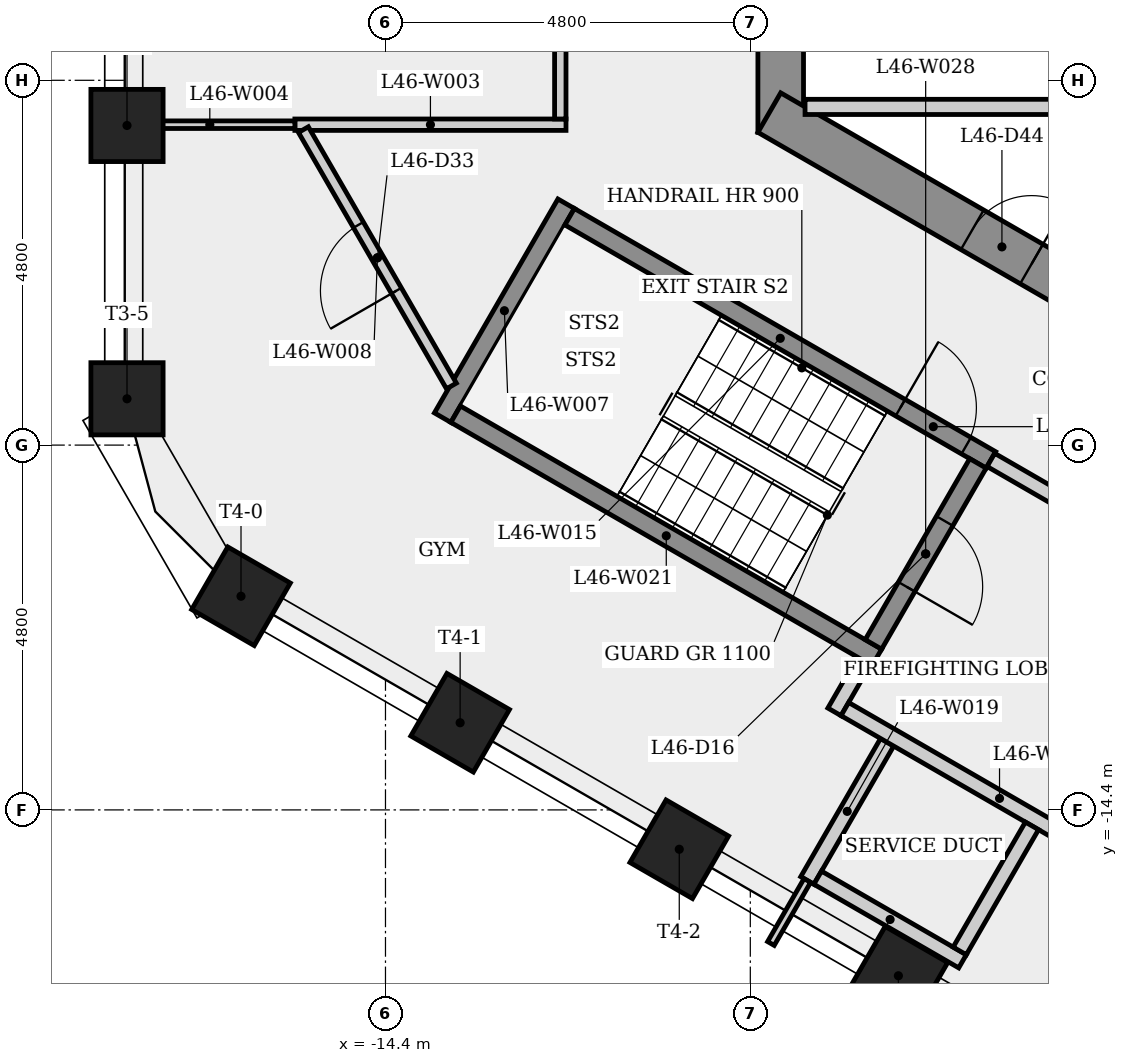
"""IFC4 building model, lengths in metres.
Left out: names, types, materials, properties, quantities, classifications, styles, units other than length and angle.
Written with IfcOpenShell. Run it as: python <this file> out.ifc"""

import sys

from ifc_helpers import new_model, si_unit, direction, frame, frame_2d, origin, origin_2d, place, context, subcontext, project, spatial, rectangle, extrude, element, fill, save


model = new_model("IFC4")
c1 = context("Model", 3, precision=1e-05, world=origin(), true_north=direction((0.0, 1.0)))
c2 = subcontext(c1, "Body", "Model", "MODEL_VIEW")
j1 = project(units=[si_unit("LENGTHUNIT", "METRE"), si_unit("PLANEANGLEUNIT", "RADIAN")], contexts=[c1])
p1 = place(None, origin())
s1 = spatial("IfcSite", under=j1, at=p1, CompositionType="ELEMENT")
p2 = place(p1, origin())
s2 = spatial("IfcBuilding", under=s1, at=p2, CompositionType="ELEMENT")
p3 = place(p2, frame((0.0, 0.0, 173.1)))
s3 = spatial("IfcBuildingStorey", under=s2, at=p3, CompositionType="ELEMENT", Elevation=173.1)
p4 = place(p3, frame((-9.2, 5.485, 0.0), z_axis=(0.0, 0.0, 1.0), x_axis=(0.0, -1.0, 0.0)))
e1 = element("IfcWall", 1, at=p4, inside=s3, PredefinedType="SHEAR", context=c2, shape_type="SweptSolid", body=[
    extrude(rectangle(XDim=10.97, YDim=0.6, at=frame_2d((5.485, 0.0))), origin(), (0.0, 0.0, 1.0), 3.4),
])
p5 = place(p4, frame((8.516, 0.0, 0.0)))
e2 = element("IfcOpeningElement", 2, at=p5, cuts=e1, PredefinedType="OPENING", context=c2, shape_type="SweptSolid", body=[
    extrude(rectangle(XDim=0.9, YDim=2.1, at=frame_2d((0.45, 1.05))), frame((0.0, 0.31, 0.0), z_axis=(0.0, -1.0, 0.0), x_axis=(1.0, 0.0, 0.0)), (0.0, 0.0, 1.0), 0.62),
])
p6 = place(p4, frame((4.685, 0.0, 0.0)))
e3 = element("IfcOpeningElement", 3, at=p6, cuts=e1, PredefinedType="OPENING", context=c2, shape_type="SweptSolid", body=[
    extrude(rectangle(XDim=1.6, YDim=2.1, at=frame_2d((0.8, 1.05))), frame((0.0, 0.31, 0.0), z_axis=(0.0, -1.0, 0.0), x_axis=(1.0, 0.0, 0.0)), (0.0, 0.0, 1.0), 0.62),
])
p7 = place(p3, frame((-9.35, -5.225, 0.0), z_axis=(0.0, 0.0, 1.0), x_axis=(0.866023993627, -0.500002442456, 0.0)))
e4 = element("IfcWall", 4, at=p7, inside=s3, PredefinedType="SHEAR", context=c2, shape_type="SweptSolid", body=[
    extrude(rectangle(XDim=10.97, YDim=0.6, at=frame_2d((5.485, 0.0))), origin(), (0.0, 0.0, 1.0), 3.4),
])
p8 = place(p7, frame((3.084, 0.0, 0.0)))
e5 = element("IfcOpeningElement", 5, at=p8, cuts=e4, PredefinedType="OPENING", context=c2, shape_type="SweptSolid", body=[
    extrude(rectangle(XDim=0.9, YDim=2.1, at=frame_2d((0.45, 1.05))), frame((0.0, 0.31, 0.0), z_axis=(0.0, -1.0, 0.0), x_axis=(1.0, 0.0, 0.0)), (0.0, 0.0, 1.0), 0.62),
])
p9 = place(p7, frame((8.21, 0.0, 0.0)))
e6 = element("IfcOpeningElement", 6, at=p9, cuts=e4, PredefinedType="OPENING", context=c2, shape_type="SweptSolid", body=[
    extrude(rectangle(XDim=0.9, YDim=2.1, at=frame_2d((0.45, 1.05))), frame((0.0, 0.31, 0.0), z_axis=(0.0, -1.0, 0.0), x_axis=(1.0, 0.0, 0.0)), (0.0, 0.0, 1.0), 0.62),
])
for number, where, z_axis, x_axis in (
    (7, (-17.801, -5.394, 0.0), (0.0, 0.0, 1.0), (-1.0, 0.0, 0.0)),
    (8, (-17.801, -8.991, 0.0), (0.0, 0.0, 1.0), (-1.0, 0.0, 0.0)),
    (9, (-16.301, -11.589, 0.0), (0.0, 0.0, 1.0), (-0.5, -0.866, 0.0)),
    (10, (-13.418, -13.253, 0.0), (0.0, 0.0, 1.0), (-0.5, -0.866, 0.0)),
    (11, (-10.535, -14.918, 0.0), (0.0, 0.0, 1.0), (-0.5, -0.866, 0.0)),
    (12, (-7.652, -16.582, 0.0), (0.0, 0.0, 1.0), (-0.5, -0.866, 0.0)),
):
    element("IfcColumn", number, at=place(p3, frame(where, z_axis=z_axis, x_axis=x_axis)), inside=s3, PredefinedType="COLUMN", context=c2, shape_type="SweptSolid", body=[
        extrude(rectangle(XDim=0.95, YDim=0.95, at=origin_2d()), origin(), (0.0, 0.0, 1.0), 3.4),
    ])
p10 = place(p3, frame((-15.592, -5.384, 0.0), z_axis=(0.0, 0.0, 1.0), x_axis=(1.0, 0.0, 0.0)))
e13 = element("IfcWall", 13, at=p10, inside=s3, PredefinedType="PARTITIONING", context=c2, shape_type="SweptSolid", body=[
    extrude(rectangle(XDim=3.567, YDim=0.15, at=frame_2d((1.784, 0.0))), origin(), (0.0, 0.0, 1.0), 3.05),
])
p11 = place(p3, frame((-15.592, -5.384, 0.0), z_axis=(0.0, 0.0, 1.0), x_axis=(-1.0, 0.0, 0.0)))
e14 = element("IfcWall", 14, at=p11, inside=s3, PredefinedType="PARTITIONING", context=c2, shape_type="SweptSolid", body=[
    extrude(rectangle(XDim=2.239, YDim=0.1, at=frame_2d((1.119, 0.0))), origin(), (0.0, 0.0, 1.0), 3.05),
])
p12 = place(p3, frame((-13.648, -9.239, 0.0), z_axis=(0.0, 0.0, 1.0), x_axis=(0.500017246033, 0.866015446554, 0.0)))
e15 = element("IfcWall", 15, at=p12, inside=s3, PredefinedType="SHEAR", context=c2, shape_type="SweptSolid", body=[
    extrude(rectangle(XDim=3.25, YDim=0.25, at=frame_2d((1.625, 0.0))), origin(), (0.0, 0.0, 1.0), 3.05),
])
p13 = place(p3, frame((-13.532, -8.822, 0.0), z_axis=(0.0, 0.0, 1.0), x_axis=(-0.500042595688, 0.866000809756, 0.0)))
e16 = element("IfcWall", 16, at=p13, inside=s3, PredefinedType="PARTITIONING", context=c2, shape_type="SweptSolid", body=[
    extrude(rectangle(XDim=3.895, YDim=0.15, at=frame_2d((1.947, 0.0))), origin(), (0.0, 0.0, 1.0), 3.05),
])
p14 = place(p13, frame((1.448, 0.0, 0.0)))
e17 = element("IfcOpeningElement", 17, at=p14, cuts=e16, PredefinedType="OPENING", context=c2, shape_type="SweptSolid", body=[
    extrude(rectangle(XDim=1.0, YDim=2.1, at=frame_2d((0.5, 1.05))), frame((0.0, 0.085, 0.0), z_axis=(0.0, -1.0, 0.0), x_axis=(1.0, 0.0, 0.0)), (0.0, 0.0, 1.0), 0.17),
])
p15 = place(p3, frame((-12.1, -5.309, 0.0), z_axis=(0.0, 0.0, 1.0), x_axis=(0.0, 1.0, 0.0)))
e18 = element("IfcWall", 18, at=p15, inside=s3, PredefinedType="PARTITIONING", context=c2, shape_type="SweptSolid", body=[
    extrude(rectangle(XDim=10.768, YDim=0.15, at=frame_2d((5.384, 0.0))), origin(), (0.0, 0.0, 1.0), 3.05),
])
p16 = place(p15, frame((7.504, 0.0, 0.0)))
e19 = element("IfcOpeningElement", 19, at=p16, cuts=e18, PredefinedType="OPENING", context=c2, shape_type="SweptSolid", body=[
    extrude(rectangle(XDim=0.9, YDim=2.1, at=frame_2d((0.45, 1.05))), frame((0.0, 0.085, 0.0), z_axis=(0.0, -1.0, 0.0), x_axis=(1.0, 0.0, 0.0)), (0.0, 0.0, 1.0), 0.17),
])
p17 = place(p15, frame((4.809, 0.0, 0.0)))
e20 = element("IfcOpeningElement", 20, at=p17, cuts=e18, PredefinedType="OPENING", context=c2, shape_type="SweptSolid", body=[
    extrude(rectangle(XDim=1.0, YDim=2.1, at=frame_2d((0.5, 1.05))), frame((0.0, 0.085, 0.0), z_axis=(0.0, -1.0, 0.0), x_axis=(1.0, 0.0, 0.0)), (0.0, 0.0, 1.0), 0.17),
])
p18 = place(p15, frame((1.242, 0.0, 0.0)))
e21 = element("IfcOpeningElement", 21, at=p18, cuts=e18, PredefinedType="OPENING", context=c2, shape_type="SweptSolid", body=[
    extrude(rectangle(XDim=1.0, YDim=2.1, at=frame_2d((0.5, 1.05))), frame((0.0, 0.085, 0.0), z_axis=(0.0, -1.0, 0.0), x_axis=(1.0, 0.0, 0.0)), (0.0, 0.0, 1.0), 0.17),
])
p19 = place(p3, frame((-11.977, -6.595, 0.0), z_axis=(0.0, 0.0, 1.0), x_axis=(0.866025499775, -0.499999833739, 0.0)))
e22 = element("IfcWall", 22, at=p19, inside=s3, PredefinedType="SHEAR", context=c2, shape_type="SweptSolid", body=[
    extrude(rectangle(XDim=6.4, YDim=0.25, at=frame_2d((3.2, 0.0))), origin(), (0.0, 0.0, 1.0), 3.05),
])
p20 = place(p19, frame((5.025, 0.0, 0.0)))
e23 = element("IfcOpeningElement", 23, at=p20, cuts=e22, PredefinedType="OPENING", context=c2, shape_type="SweptSolid", body=[
    extrude(rectangle(XDim=1.0, YDim=2.1, at=frame_2d((0.5, 1.05))), frame((0.0, 0.135, 0.0), z_axis=(0.0, -1.0, 0.0), x_axis=(1.0, 0.0, 0.0)), (0.0, 0.0, 1.0), 0.27),
])
p21 = place(p3, frame((-8.88, -5.15, 0.0), z_axis=(0.0, 0.0, 1.0), x_axis=(1.0, 0.0, 0.0)))
e24 = element("IfcWall", 24, at=p21, inside=s3, PredefinedType="PARTITIONING", context=c2, shape_type="SweptSolid", body=[
    extrude(rectangle(XDim=11.205, YDim=0.2, at=frame_2d((5.603, 0.0))), origin(), (0.0, 0.0, 1.0), 3.05),
])
p22 = place(p3, frame((-8.85, -15.329, 0.0), z_axis=(0.0, 0.0, 1.0), x_axis=(0.500027713859, 0.866009402589, 0.0)))
e25 = element("IfcWall", 25, at=p22, inside=s3, PredefinedType="PLUMBINGWALL", context=c2, shape_type="SweptSolid", body=[
    extrude(rectangle(XDim=2.1, YDim=0.2, at=frame_2d((1.05, 0.0))), origin(), (0.0, 0.0, 1.0), 3.05),
])
p23 = place(p3, frame((-8.493, -13.11, 0.0), z_axis=(0.0, 0.0, 1.0), x_axis=(0.500067724834, 0.865986299303, 0.0)))
e26 = element("IfcWall", 26, at=p23, inside=s3, PredefinedType="PARTITIONING", context=c2, shape_type="SweptSolid", body=[
    extrude(rectangle(XDim=0.775, YDim=0.2, at=frame_2d((0.388, 0.0))), origin(), (0.0, 0.0, 1.0), 3.05),
])
p24 = place(p3, frame((-7.935, -12.393, 0.0), z_axis=(0.0, 0.0, 1.0), x_axis=(-0.866025499775, 0.499999833739, 0.0)))
e27 = element("IfcWall", 27, at=p24, inside=s3, PredefinedType="SHEAR", context=c2, shape_type="SweptSolid", body=[
    extrude(rectangle(XDim=6.4, YDim=0.25, at=frame_2d((3.2, 0.0))), origin(), (0.0, 0.0, 1.0), 3.05),
])
p25 = place(p3, frame((-9.329, -16.158, 0.0), z_axis=(0.0, 0.0, 1.0), x_axis=(0.499950501706, 0.866053979752, 0.0)))
e28 = element("IfcWall", 28, at=p25, inside=s3, PredefinedType="PARTITIONING", context=c2, shape_type="SweptSolid", body=[
    extrude(rectangle(XDim=0.958, YDim=0.1, at=frame_2d((0.479, 0.0))), origin(), (0.0, 0.0, 1.0), 3.05),
])
p26 = place(p3, frame((-8.356, -13.073, 0.0), z_axis=(0.0, 0.0, 1.0), x_axis=(0.866038532462, -0.499977259774, 0.0)))
e29 = element("IfcWall", 29, at=p26, inside=s3, PredefinedType="PARTITIONING", context=c2, shape_type="SweptSolid", body=[
    extrude(rectangle(XDim=4.7, YDim=0.2, at=frame_2d((2.35, 0.0))), origin(), (0.0, 0.0, 1.0), 3.05),
])
p27 = place(p3, frame((-6.808, -16.392, 0.0), z_axis=(0.0, 0.0, 1.0), x_axis=(-0.866008176907, 0.50002983664, 0.0)))
e30 = element("IfcWall", 30, at=p27, inside=s3, PredefinedType="PLUMBINGWALL", context=c2, shape_type="SweptSolid", body=[
    extrude(rectangle(XDim=2.2, YDim=0.2, at=frame_2d((1.1, 0.0))), origin(), (0.0, 0.0, 1.0), 3.05),
])
p28 = place(p3, frame((-6.605, -9.841, 0.0), z_axis=(0.0, 0.0, 1.0), x_axis=(-0.499996545922, -0.866027397988, 0.0)))
e31 = element("IfcWall", 31, at=p28, inside=s3, PredefinedType="SHEAR", context=c2, shape_type="SweptSolid", body=[
    extrude(rectangle(XDim=2.75, YDim=0.25, at=frame_2d((1.375, 0.0))), origin(), (0.0, 0.0, 1.0), 3.05),
])
p29 = place(p28, frame((0.875, 0.0, 0.0)))
e32 = element("IfcOpeningElement", 32, at=p29, cuts=e31, PredefinedType="OPENING", context=c2, shape_type="SweptSolid", body=[
    extrude(rectangle(XDim=1.0, YDim=2.1, at=frame_2d((0.5, 1.05))), frame((0.0, 0.135, 0.0), z_axis=(0.0, -1.0, 0.0), x_axis=(1.0, 0.0, 0.0)), (0.0, 0.0, 1.0), 0.27),
])
p30 = place(p3, frame((-6.435, -9.795, 0.0), z_axis=(0.0, 0.0, 1.0), x_axis=(0.866012907634, -0.500021643343, 0.0)))
e33 = element("IfcWall", 33, at=p30, inside=s3, PredefinedType="PARTITIONING", context=c2, shape_type="SweptSolid", body=[
    extrude(rectangle(XDim=4.45, YDim=0.2, at=frame_2d((2.225, 0.0))), origin(), (0.0, 0.0, 1.0), 3.05),
])
p31 = place(p30, frame((1.675, 0.0, 0.0)))
e34 = element("IfcOpeningElement", 34, at=p31, cuts=e33, PredefinedType="OPENING", context=c2, shape_type="SweptSolid", body=[
    extrude(rectangle(XDim=1.1, YDim=2.1, at=frame_2d((0.55, 1.05))), frame((0.0, 0.11, 0.0), z_axis=(0.0, -1.0, 0.0), x_axis=(1.0, 0.0, 0.0)), (0.0, 0.0, 1.0), 0.22),
])
p32 = place(p3, frame((-5.895, -14.61, 0.0), z_axis=(0.0, 0.0, 1.0), x_axis=(-0.500022797313, -0.86601224135, 0.0)))
e35 = element("IfcWall", 35, at=p32, inside=s3, PredefinedType="PLUMBINGWALL", context=c2, shape_type="SweptSolid", body=[
    extrude(rectangle(XDim=1.9, YDim=0.2, at=frame_2d((0.95, 0.0))), origin(), (0.0, 0.0, 1.0), 3.05),
])
p33 = place(p20, origin())
e36 = element("IfcDoor", 36, at=p33, inside=s3, OperationType="SINGLE_SWING_LEFT", PredefinedType="DOOR", context=c2, shape_type="SweptSolid", body=[
    extrude(rectangle(XDim=1.0, YDim=2.1, at=frame_2d((0.5, 1.05))), frame((0.0, 0.025, 0.0), z_axis=(0.0, -1.0, 0.0), x_axis=(1.0, 0.0, 0.0)), (0.0, 0.0, 1.0), 0.05),
])
fill(e23, e36)
p34 = place(p29, origin())
e37 = element("IfcDoor", 37, at=p34, inside=s3, OperationType="SINGLE_SWING_RIGHT", PredefinedType="DOOR", context=c2, shape_type="SweptSolid", body=[
    extrude(rectangle(XDim=1.0, YDim=2.1, at=frame_2d((0.5, 1.05))), frame((0.0, 0.025, 0.0), z_axis=(0.0, -1.0, 0.0), x_axis=(1.0, 0.0, 0.0)), (0.0, 0.0, 1.0), 0.05),
])
fill(e32, e37)
p35 = place(p14, origin())
e38 = element("IfcDoor", 38, at=p35, inside=s3, OperationType="SINGLE_SWING_LEFT", PredefinedType="DOOR", context=c2, shape_type="SweptSolid", body=[
    extrude(rectangle(XDim=1.0, YDim=2.1, at=frame_2d((0.5, 1.05))), frame((0.0, 0.025, 0.0), z_axis=(0.0, -1.0, 0.0), x_axis=(1.0, 0.0, 0.0)), (0.0, 0.0, 1.0), 0.05),
])
fill(e17, e38)
p36 = place(p8, origin())
e39 = element("IfcDoor", 39, at=p36, inside=s3, OperationType="SINGLE_SWING_RIGHT", PredefinedType="DOOR", context=c2, shape_type="SweptSolid", body=[
    extrude(rectangle(XDim=0.9, YDim=2.1, at=frame_2d((0.45, 1.05))), frame((0.0, 0.025, 0.0), z_axis=(0.0, -1.0, 0.0), x_axis=(1.0, 0.0, 0.0)), (0.0, 0.0, 1.0), 0.05),
])
fill(e5, e39)
save(model, sys.argv[1])
